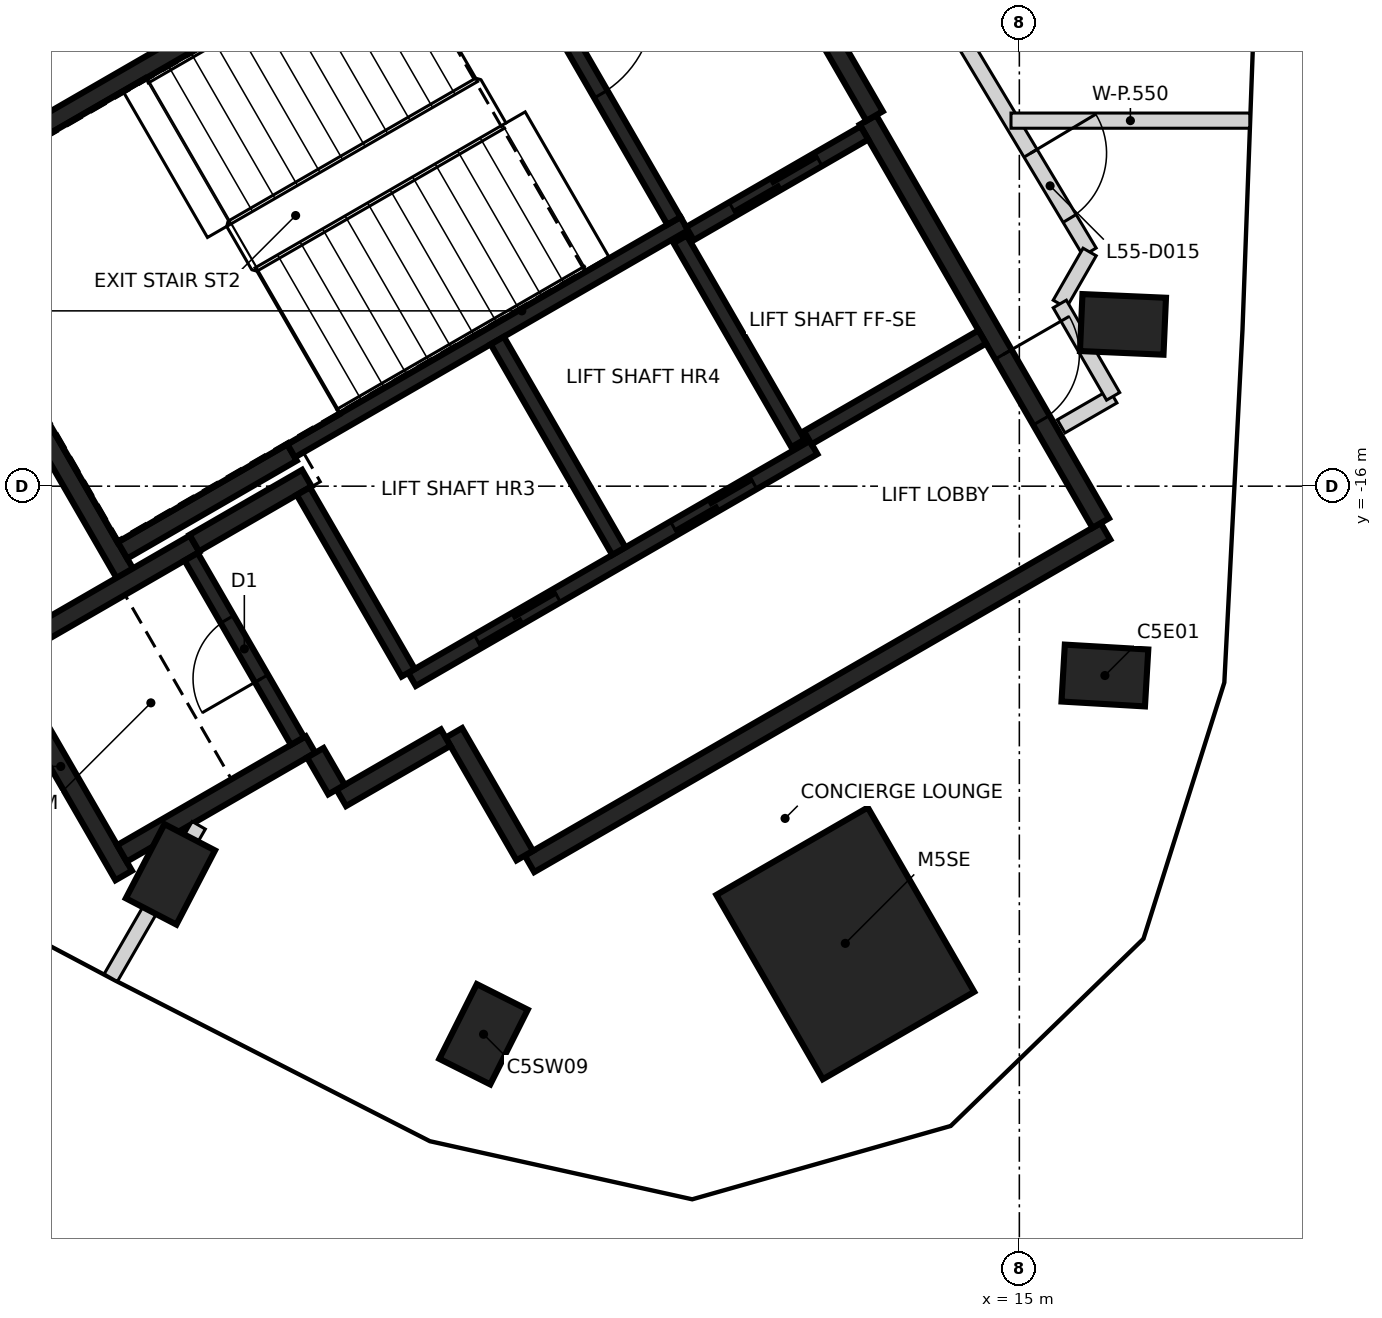
"""IFC4 building model, lengths in metres.
Left out: names, types, materials, properties, quantities, classifications, styles, units other than length and angle.
Written with IfcOpenShell. Run it as: python <this file> out.ifc"""

import sys

from ifc_helpers import new_model, si_unit, direction, frame, frame_2d, origin, origin_2d, place, context, subcontext, project, spatial, rectangle, extrude, element, fill, save


model = new_model("IFC4")
c1 = context("Model", 3, precision=1e-05, world=origin(), true_north=direction((0.0, 1.0)))
c2 = subcontext(c1, "Body", "Model", "MODEL_VIEW")
j1 = project(units=[si_unit("LENGTHUNIT", "METRE"), si_unit("PLANEANGLEUNIT", "RADIAN")], contexts=[c1])
p1 = place(None, origin())
s1 = spatial("IfcSite", under=j1, at=p1, CompositionType="ELEMENT")
p2 = place(p1, origin())
s2 = spatial("IfcBuilding", under=s1, at=p2, CompositionType="ELEMENT")
p3 = place(p2, frame((0.0, 0.0, 221.4)))
s3 = spatial("IfcBuildingStorey", under=s2, at=p3, CompositionType="ELEMENT", Elevation=221.4)
for number, where, z_axis, x_axis in (
    (1, (16.125, -18.491, -0.35), (0.0, 0.0, 1.0), (-0.998, 0.058, 0.0)),
    (2, (16.363, -13.872, -0.35), (0.0, 0.0, 1.0), (-0.999, 0.044, 0.0)),
    (3, (3.832, -21.107, -0.35), (0.0, 0.0, 1.0), (0.461, 0.887, 0.0)),
    (4, (7.951, -23.211, -0.35), (0.0, 0.0, 1.0), (0.449, 0.894, 0.0)),
):
    element("IfcColumn", number, at=place(p3, frame(where, z_axis=z_axis, x_axis=x_axis)), inside=s3, PredefinedType="COLUMN", context=c2, shape_type="SweptSolid", body=[
        extrude(rectangle(XDim=1.1, YDim=0.75, at=origin_2d()), origin(), (0.0, 0.0, 1.0), 3.6),
    ])
p4 = place(p3, frame((12.71, -22.015, -0.35), z_axis=(0.0, 0.0, 1.0), x_axis=(-0.5, 0.866025403784, 0.0)))
e5 = element("IfcColumn", 5, at=p4, inside=s3, PredefinedType="COLUMN", context=c2, shape_type="SweptSolid", body=[
    extrude(rectangle(XDim=2.8, YDim=2.3, at=origin_2d()), origin(), (0.0, 0.0, 1.0), 3.6),
])
p5 = place(p3, frame((0.417, -12.273, 0.0), z_axis=(0.0, 0.0, 1.0), x_axis=(0.866021906294, 0.500006057782, 0.0)))
e6 = element("IfcWall", 6, at=p5, inside=s3, PredefinedType="SHEAR", context=c2, shape_type="SweptSolid", body=[
    extrude(rectangle(XDim=11.55, YDim=0.25, at=frame_2d((5.775, 0.0))), origin(), (0.0, 0.0, 1.0), 3.25),
])
p6 = place(p5, frame((10.025, 0.0, 0.0)))
e7 = element("IfcOpeningElement", 7, at=p6, cuts=e6, PredefinedType="OPENING", context=c2, shape_type="SweptSolid", body=[
    extrude(rectangle(XDim=1.2, YDim=2.1, at=frame_2d((0.6, 1.05))), frame((0.0, 0.135, 0.0), z_axis=(0.0, -1.0, 0.0), x_axis=(1.0, 0.0, 0.0)), (0.0, 0.0, 1.0), 0.27),
])
p7 = place(p5, frame((8.725, 0.0, 0.0)))
e8 = element("IfcOpeningElement", 8, at=p7, cuts=e6, PredefinedType="OPENING", context=c2, shape_type="SweptSolid", body=[
    extrude(rectangle(XDim=1.2, YDim=2.1, at=frame_2d((0.6, 1.05))), frame((0.0, 0.135, 0.0), z_axis=(0.0, -1.0, 0.0), x_axis=(1.0, 0.0, 0.0)), (0.0, 0.0, 1.0), 0.27),
])
p8 = place(p3, frame((16.133, -16.594, 0.0), z_axis=(0.0, 0.0, 1.0), x_axis=(-0.866022959057, -0.500004234368, 0.0)))
e9 = element("IfcWall", 9, at=p8, inside=s3, PredefinedType="SHEAR", context=c2, shape_type="SweptSolid", body=[
    extrude(rectangle(XDim=8.75, YDim=0.25, at=frame_2d((4.375, 0.0))), origin(), (0.0, 0.0, 1.0), 3.25),
])
p9 = place(p3, frame((13.008, -11.181, 0.0), z_axis=(0.0, 0.0, 1.0), x_axis=(0.500001955336, -0.866024274868, 0.0)))
e10 = element("IfcWall", 10, at=p9, inside=s3, PredefinedType="SHEAR", context=c2, shape_type="SweptSolid", body=[
    extrude(rectangle(XDim=6.125, YDim=0.25, at=frame_2d((3.062, 0.0))), origin(), (0.0, 0.0, 1.0), 3.25),
])
p10 = place(p9, frame((3.563, 0.0, 0.0)))
e11 = element("IfcOpeningElement", 11, at=p10, cuts=e10, PredefinedType="OPENING", context=c2, shape_type="SweptSolid", body=[
    extrude(rectangle(XDim=1.0, YDim=2.1, at=frame_2d((0.5, 1.05))), frame((0.0, 0.135, 0.0), z_axis=(0.0, -1.0, 0.0), x_axis=(1.0, 0.0, 0.0)), (0.0, 0.0, 1.0), 0.27),
])
p11 = place(p3, frame((3.235, -17.153, 0.0), z_axis=(0.0, 0.0, 1.0), x_axis=(-0.500008851346, 0.866020293397, 0.0)))
e12 = element("IfcWall", 12, at=p11, inside=s3, PredefinedType="SHEAR", context=c2, shape_type="SweptSolid", body=[
    extrude(rectangle(XDim=5.51, YDim=0.25, at=frame_2d((2.755, 0.0))), origin(), (0.0, 0.0, 1.0), 3.25),
])
p12 = place(p3, frame((10.483, -6.606, 0.0), z_axis=(0.0, 0.0, 1.0), x_axis=(0.49999885962, -0.866026062182, 0.0)))
e13 = element("IfcWall", 13, at=p12, inside=s3, PredefinedType="SHEAR", context=c2, shape_type="SweptSolid", body=[
    extrude(rectangle(XDim=5.225, YDim=0.25, at=frame_2d((2.612, 0.0))), origin(), (0.0, 0.0, 1.0), 3.25),
])
p13 = place(p3, frame((3.217, -21.122, 0.0), z_axis=(0.0, 0.0, 1.0), x_axis=(-0.499998874531, 0.866026053573, 0.0)))
e14 = element("IfcWall", 14, at=p13, inside=s3, PredefinedType="SHEAR", context=c2, shape_type="SweptSolid", body=[
    extrude(rectangle(XDim=3.313, YDim=0.25, at=frame_2d((1.656, 0.0))), origin(), (0.0, 0.0, 1.0), 3.25),
])
p14 = place(p3, frame((1.669, -18.19, 0.0), z_axis=(0.0, 0.0, 1.0), x_axis=(0.866042235819, 0.499970844928, 0.0)))
e15 = element("IfcWall", 15, at=p14, inside=s3, PredefinedType="SHEAR", context=c2, shape_type="SweptSolid", body=[
    extrude(rectangle(XDim=2.865, YDim=0.25, at=frame_2d((1.432, 0.0))), origin(), (0.0, 0.0, 1.0), 3.25),
])
p15 = place(p3, frame((5.675, -19.399, 0.0), z_axis=(0.0, 0.0, 1.0), x_axis=(-0.866026637627, -0.499997862916, 0.0)))
e16 = element("IfcWall", 16, at=p15, inside=s3, PredefinedType="SHEAR", context=c2, shape_type="SweptSolid", body=[
    extrude(rectangle(XDim=2.865, YDim=0.25, at=frame_2d((1.432, 0.0))), origin(), (0.0, 0.0, 1.0), 3.25),
])
p16 = place(p3, frame((5.431, -15.556, 0.0), z_axis=(0.0, 0.0, 1.0), x_axis=(-0.866022940537, -0.500004266446, 0.0)))
e17 = element("IfcWall", 17, at=p16, inside=s3, PredefinedType="SHEAR", context=c2, shape_type="SweptSolid", body=[
    extrude(rectangle(XDim=2.575, YDim=0.25, at=frame_2d((1.287, 0.0))), origin(), (0.0, 0.0, 1.0), 3.25),
])
p17 = place(p3, frame((8.493, -20.86, 0.0), z_axis=(0.0, 0.0, 1.0), x_axis=(-0.500039802285, 0.866002422705, 0.0)))
e18 = element("IfcWall", 18, at=p17, inside=s3, PredefinedType="SHEAR", context=c2, shape_type="SweptSolid", body=[
    extrude(rectangle(XDim=1.865, YDim=0.25, at=frame_2d((0.932, 0.0))), origin(), (0.0, 0.0, 1.0), 3.25),
])
p18 = place(p3, frame((4.145, -16.749, 0.0), z_axis=(0.0, 0.0, 1.0), x_axis=(0.866038183914, 0.499977863513, 0.0)))
e19 = element("IfcWall", 19, at=p18, inside=s3, PredefinedType="SHEAR", context=c2, shape_type="SweptSolid", body=[
    extrude(rectangle(XDim=1.71, YDim=0.25, at=frame_2d((0.855, 0.0))), origin(), (0.0, 0.0, 1.0), 3.25),
])
p19 = place(p3, frame((7.452, -19.308, 0.0), z_axis=(0.0, 0.0, 1.0), x_axis=(-0.866044474677, -0.49996696679, 0.0)))
e20 = element("IfcWall", 20, at=p19, inside=s3, PredefinedType="SHEAR", context=c2, shape_type="SweptSolid", body=[
    extrude(rectangle(XDim=1.584, YDim=0.25, at=frame_2d((0.792, 0.0))), origin(), (0.0, 0.0, 1.0), 3.25),
])
p20 = place(p3, frame((6.017, -19.992, 0.0), z_axis=(0.0, 0.0, 1.0), x_axis=(-0.500364886717, 0.865814633822, 0.0)))
e21 = element("IfcWall", 21, at=p20, inside=s3, PredefinedType="SHEAR", context=c2, shape_type="SweptSolid", body=[
    extrude(rectangle(XDim=0.559, YDim=0.25, at=frame_2d((0.28, 0.0))), origin(), (0.0, 0.0, 1.0), 3.25),
])
p21 = place(p3, frame((5.419, -15.534, 0.0), z_axis=(0.0, 0.0, 1.0), x_axis=(0.866029065029, 0.499993658486, 0.0)))
e22 = element("IfcWall", 22, at=p21, inside=s3, PredefinedType="SHEAR", context=c2, shape_type="SweptSolid", body=[
    extrude(rectangle(XDim=5.974, YDim=0.2, at=frame_2d((2.987, 0.0))), origin(), (0.0, 0.0, 1.0), 3.25),
])
p22 = place(p3, frame((7.01, -18.542, 0.0), z_axis=(0.0, 0.0, 1.0), x_axis=(0.866030299012, 0.499991521122, 0.0)))
e23 = element("IfcWall", 23, at=p22, inside=s3, PredefinedType="SHEAR", context=c2, shape_type="SweptSolid", body=[
    extrude(rectangle(XDim=6.1, YDim=0.2, at=frame_2d((3.05, 0.0))), origin(), (0.0, 0.0, 1.0), 3.25),
])
p23 = place(p22, frame((1.0, 0.0, 0.0)))
e24 = element("IfcOpeningElement", 24, at=p23, cuts=e23, PredefinedType="OPENING", context=c2, shape_type="SweptSolid", body=[
    extrude(rectangle(XDim=1.2, YDim=2.1, at=frame_2d((0.6, 1.05))), frame((0.0, 0.11, 0.0), z_axis=(0.0, -1.0, 0.0), x_axis=(1.0, 0.0, 0.0)), (0.0, 0.0, 1.0), 0.22),
])
p24 = place(p22, frame((3.982, 0.0, 0.0)))
e25 = element("IfcOpeningElement", 25, at=p24, cuts=e23, PredefinedType="OPENING", context=c2, shape_type="SweptSolid", body=[
    extrude(rectangle(XDim=1.2, YDim=2.1, at=frame_2d((0.6, 1.05))), frame((0.0, 0.11, 0.0), z_axis=(0.0, -1.0, 0.0), x_axis=(1.0, 0.0, 0.0)), (0.0, 0.0, 1.0), 0.22),
])
p25 = place(p3, frame((7.906, -8.094, 0.0), z_axis=(0.0, 0.0, 1.0), x_axis=(0.500027839223, -0.866009330205, 0.0)))
e26 = element("IfcWall", 26, at=p25, inside=s3, PredefinedType="SHEAR", context=c2, shape_type="SweptSolid", body=[
    extrude(rectangle(XDim=5.098, YDim=0.2, at=frame_2d((2.549, 0.0))), origin(), (0.0, 0.0, 1.0), 3.25),
])
p26 = place(p25, frame((1.774, 0.0, 0.0)))
e27 = element("IfcOpeningElement", 27, at=p26, cuts=e26, PredefinedType="OPENING", context=c2, shape_type="SweptSolid", body=[
    extrude(rectangle(XDim=1.4, YDim=2.1, at=frame_2d((0.7, 1.05))), frame((0.0, 0.11, 0.0), z_axis=(0.0, -1.0, 0.0), x_axis=(1.0, 0.0, 0.0)), (0.0, 0.0, 1.0), 0.22),
])
p27 = place(p3, frame((8.132, -14.084, 0.0), z_axis=(0.0, 0.0, 1.0), x_axis=(0.499997778408, -0.866026686418, 0.0)))
e28 = element("IfcWall", 28, at=p27, inside=s3, PredefinedType="SHEAR", context=c2, shape_type="SweptSolid", body=[
    extrude(rectangle(XDim=3.198, YDim=0.2, at=frame_2d((1.599, 0.0))), origin(), (0.0, 0.0, 1.0), 3.25),
])
p28 = place(p3, frame((5.503, -19.352, 0.0), z_axis=(0.0, 0.0, 1.0), x_axis=(-0.499986818241, 0.866033014143, 0.0)))
e29 = element("IfcWall", 29, at=p28, inside=s3, PredefinedType="SHEAR", context=c2, shape_type="SweptSolid", body=[
    extrude(rectangle(XDim=2.798, YDim=0.2, at=frame_2d((1.399, 0.0))), origin(), (0.0, 0.0, 1.0), 3.25),
])
p29 = place(p28, frame((0.949, 0.0, 0.0)))
e30 = element("IfcOpeningElement", 30, at=p29, cuts=e29, PredefinedType="OPENING", context=c2, shape_type="SweptSolid", body=[
    extrude(rectangle(XDim=0.9, YDim=2.1, at=frame_2d((0.45, 1.05))), frame((0.0, 0.11, 0.0), z_axis=(0.0, -1.0, 0.0), x_axis=(1.0, 0.0, 0.0)), (0.0, 0.0, 1.0), 0.22),
])
p30 = place(p3, frame((6.96, -18.455, 0.0), z_axis=(0.0, 0.0, 1.0), x_axis=(-0.499926705758, 0.866067716099, 0.0)))
e31 = element("IfcWall", 31, at=p30, inside=s3, PredefinedType="SHEAR", context=c2, shape_type="SweptSolid", body=[
    extrude(rectangle(XDim=2.759, YDim=0.2, at=frame_2d((1.38, 0.0))), origin(), (0.0, 0.0, 1.0), 3.25),
])
p31 = place(p3, frame((12.088, -15.437, 0.0), z_axis=(0.0, 0.0, 1.0), x_axis=(-0.500026960575, 0.86600983753, 0.0)))
e32 = element("IfcWall", 32, at=p31, inside=s3, PredefinedType="SHEAR", context=c2, shape_type="SweptSolid", body=[
    extrude(rectangle(XDim=3.1, YDim=0.2, at=frame_2d((1.55, 0.0))), origin(), (0.0, 0.0, 1.0), 3.25),
])
p32 = place(p3, frame((10.666, -12.678, 0.0), z_axis=(0.0, 0.0, 1.0), x_axis=(0.866018407898, 0.500012117035, 0.0)))
e33 = element("IfcWall", 33, at=p32, inside=s3, PredefinedType="SHEAR", context=c2, shape_type="SweptSolid", body=[
    extrude(rectangle(XDim=2.651, YDim=0.2, at=frame_2d((1.325, 0.0))), origin(), (0.0, 0.0, 1.0), 3.25),
])
p33 = place(p32, frame((0.652, 0.0, 0.0)))
e34 = element("IfcOpeningElement", 34, at=p33, cuts=e33, PredefinedType="OPENING", context=c2, shape_type="SweptSolid", body=[
    extrude(rectangle(XDim=1.3, YDim=2.1, at=frame_2d((0.65, 1.05))), frame((0.0, 0.11, 0.0), z_axis=(0.0, -1.0, 0.0), x_axis=(1.0, 0.0, 0.0)), (0.0, 0.0, 1.0), 0.22),
])
p34 = place(p3, frame((14.512, -14.037, 0.0), z_axis=(0.0, 0.0, 1.0), x_axis=(-0.866018407898, -0.500012117035, 0.0)))
e35 = element("IfcWall", 35, at=p34, inside=s3, PredefinedType="SHEAR", context=c2, shape_type="SweptSolid", body=[
    extrude(rectangle(XDim=2.651, YDim=0.2, at=frame_2d((1.325, 0.0))), origin(), (0.0, 0.0, 1.0), 3.25),
])
p35 = place(p3, frame((11.217, -5.058, 0.0), z_axis=(0.0, 0.0, 1.0), x_axis=(0.513856906336, -0.857875911662, 0.0)))
e36 = element("IfcWall", 36, at=p35, inside=s3, PredefinedType="PARTITIONING", context=c2, shape_type="SweptSolid", body=[
    extrude(rectangle(XDim=9.163, YDim=0.2, at=frame_2d((4.581, 0.0))), origin(), (0.0, 0.0, 1.0), 3.25),
])
p36 = place(p35, frame((7.65, 0.0, 0.0)))
e37 = element("IfcOpeningElement", 37, at=p36, cuts=e36, PredefinedType="OPENING", context=c2, shape_type="SweptSolid", body=[
    extrude(rectangle(XDim=1.0, YDim=2.1, at=frame_2d((0.5, 1.05))), frame((0.0, 0.11, 0.0), z_axis=(0.0, -1.0, 0.0), x_axis=(1.0, 0.0, 0.0)), (0.0, 0.0, 1.0), 0.22),
])
p37 = place(p3, frame((15.55, -15.213, 0.0), z_axis=(0.0, 0.0, 1.0), x_axis=(0.865989998118, 0.500061319399, 0.0)))
e38 = element("IfcWall", 38, at=p37, inside=s3, PredefinedType="PARTITIONING", context=c2, shape_type="SweptSolid", body=[
    extrude(rectangle(XDim=0.79, YDim=0.2, at=frame_2d((0.395, 0.0))), origin(), (0.0, 0.0, 1.0), 2.35),
])
p38 = place(p3, frame((15.532, -13.603, 0.0), z_axis=(0.0, 0.0, 1.0), x_axis=(0.498203662485, 0.867060038686, 0.0)))
e39 = element("IfcWall", 39, at=p38, inside=s3, PredefinedType="PARTITIONING", context=c2, shape_type="SweptSolid", body=[
    extrude(rectangle(XDim=0.789, YDim=0.2, at=frame_2d((0.395, 0.0))), origin(), (0.0, 0.0, 1.0), 3.25),
])
p39 = place(p3, frame((15.532, -13.603, 0.0), z_axis=(0.0, 0.0, 1.0), x_axis=(0.500199332748, -0.865910288378, 0.0)))
e40 = element("IfcWall", 40, at=p39, inside=s3, PredefinedType="PARTITIONING", context=c2, shape_type="SweptSolid", body=[
    extrude(rectangle(XDim=1.403, YDim=0.2, at=frame_2d((0.702, 0.0))), origin(), (0.0, 0.0, 1.0), 2.35),
])
p40 = place(p3, frame((3.047, -22.467, 0.0), z_axis=(0.0, 0.0, 1.0), x_axis=(0.50001757531, 0.866015256437, 0.0)))
e41 = element("IfcWall", 41, at=p40, inside=s3, PredefinedType="PARTITIONING", context=c2, shape_type="SweptSolid", body=[
    extrude(rectangle(XDim=2.315, YDim=0.2, at=frame_2d((1.158, 0.0))), origin(), (0.0, 0.0, 1.0), 3.25),
])
p41 = place(p3, frame((14.89, -11.191, 0.0), z_axis=(0.0, 0.0, 1.0), x_axis=(1.0, 0.0, 0.0)))
e42 = element("IfcWall", 42, at=p41, inside=s3, PredefinedType="PARTITIONING", context=c2, shape_type="SweptSolid", body=[
    extrude(rectangle(XDim=3.142, YDim=0.2, at=frame_2d((1.571, 0.0))), origin(), (0.0, 0.0, 1.0), 2.35),
])
p42 = place(p3, frame((1.114, -11.036, 0.0), z_axis=(0.0, 0.0, 1.0), x_axis=(0.50002537861, 0.866010750942, 0.0)))
e43 = element("IfcWall", 43, at=p42, inside=s3, PredefinedType="PARTITIONING", context=c2, shape_type="SweptSolid", body=[
    extrude(rectangle(XDim=3.0, YDim=0.15, at=frame_2d((1.5, 0.0))), origin(), (0.0, 0.0, 1.0), 3.25),
])
p43 = place(p42, frame((1.1, 0.0, 0.0)))
e44 = element("IfcOpeningElement", 44, at=p43, cuts=e43, PredefinedType="OPENING", context=c2, shape_type="SweptSolid", body=[
    extrude(rectangle(XDim=0.8, YDim=2.1, at=frame_2d((0.4, 1.05))), frame((0.0, 0.085, 0.0), z_axis=(0.0, -1.0, 0.0), x_axis=(1.0, 0.0, 0.0)), (0.0, 0.0, 1.0), 0.17),
])
p44 = place(p33, origin())
e45 = element("IfcDoor", 45, at=p44, inside=s3, OperationType="SLIDING_TO_RIGHT", PredefinedType="DOOR", context=c2, shape_type="SweptSolid", body=[
    extrude(rectangle(XDim=1.3, YDim=2.1, at=frame_2d((0.65, 1.05))), frame((0.0, 0.025, 0.0), z_axis=(0.0, -1.0, 0.0), x_axis=(1.0, 0.0, 0.0)), (0.0, 0.0, 1.0), 0.05),
])
fill(e34, e45)
p45 = place(p23, origin())
e46 = element("IfcDoor", 46, at=p45, inside=s3, OperationType="DOUBLE_DOOR_SLIDING", PredefinedType="DOOR", context=c2, shape_type="SweptSolid", body=[
    extrude(rectangle(XDim=1.2, YDim=2.1, at=frame_2d((0.6, 1.05))), frame((0.0, 0.025, 0.0), z_axis=(0.0, -1.0, 0.0), x_axis=(1.0, 0.0, 0.0)), (0.0, 0.0, 1.0), 0.05),
])
fill(e24, e46)
p46 = place(p24, origin())
e47 = element("IfcDoor", 47, at=p46, inside=s3, OperationType="DOUBLE_DOOR_SLIDING", PredefinedType="DOOR", context=c2, shape_type="SweptSolid", body=[
    extrude(rectangle(XDim=1.2, YDim=2.1, at=frame_2d((0.6, 1.05))), frame((0.0, 0.025, 0.0), z_axis=(0.0, -1.0, 0.0), x_axis=(1.0, 0.0, 0.0)), (0.0, 0.0, 1.0), 0.05),
])
fill(e25, e47)
p47 = place(p10, origin())
e48 = element("IfcDoor", 48, at=p47, inside=s3, OperationType="SINGLE_SWING_LEFT", PredefinedType="DOOR", context=c2, shape_type="SweptSolid", body=[
    extrude(rectangle(XDim=1.0, YDim=2.1, at=frame_2d((0.5, 1.05))), frame((0.0, 0.025, 0.0), z_axis=(0.0, -1.0, 0.0), x_axis=(1.0, 0.0, 0.0)), (0.0, 0.0, 1.0), 0.05),
])
fill(e11, e48)
p48 = place(p26, origin())
e49 = element("IfcDoor", 49, at=p48, inside=s3, OperationType="SINGLE_SWING_RIGHT", PredefinedType="DOOR", context=c2, shape_type="SweptSolid", body=[
    extrude(rectangle(XDim=1.4, YDim=2.1, at=frame_2d((0.7, 1.05))), frame((0.0, 0.025, 0.0), z_axis=(0.0, -1.0, 0.0), x_axis=(1.0, 0.0, 0.0)), (0.0, 0.0, 1.0), 0.05),
])
fill(e27, e49)
p49 = place(p29, origin())
e50 = element("IfcDoor", 50, at=p49, inside=s3, OperationType="SINGLE_SWING_LEFT", PredefinedType="DOOR", context=c2, shape_type="SweptSolid", body=[
    extrude(rectangle(XDim=0.9, YDim=2.1, at=frame_2d((0.45, 1.05))), frame((0.0, 0.025, 0.0), z_axis=(0.0, -1.0, 0.0), x_axis=(1.0, 0.0, 0.0)), (0.0, 0.0, 1.0), 0.05),
])
fill(e30, e50)
p50 = place(p36, frame((1.0, 0.0, 0.0), z_axis=(0.0, 0.0, 1.0), x_axis=(-1.0, 0.0, 0.0)))
e51 = element("IfcDoor", 51, at=p50, inside=s3, OperationType="SINGLE_SWING_LEFT", PredefinedType="DOOR", context=c2, shape_type="SweptSolid", body=[
    extrude(rectangle(XDim=1.0, YDim=2.1, at=frame_2d((0.5, 1.05))), frame((0.0, 0.025, 0.0), z_axis=(0.0, -1.0, 0.0), x_axis=(1.0, 0.0, 0.0)), (0.0, 0.0, 1.0), 0.05),
])
fill(e37, e51)
save(model, sys.argv[1])
